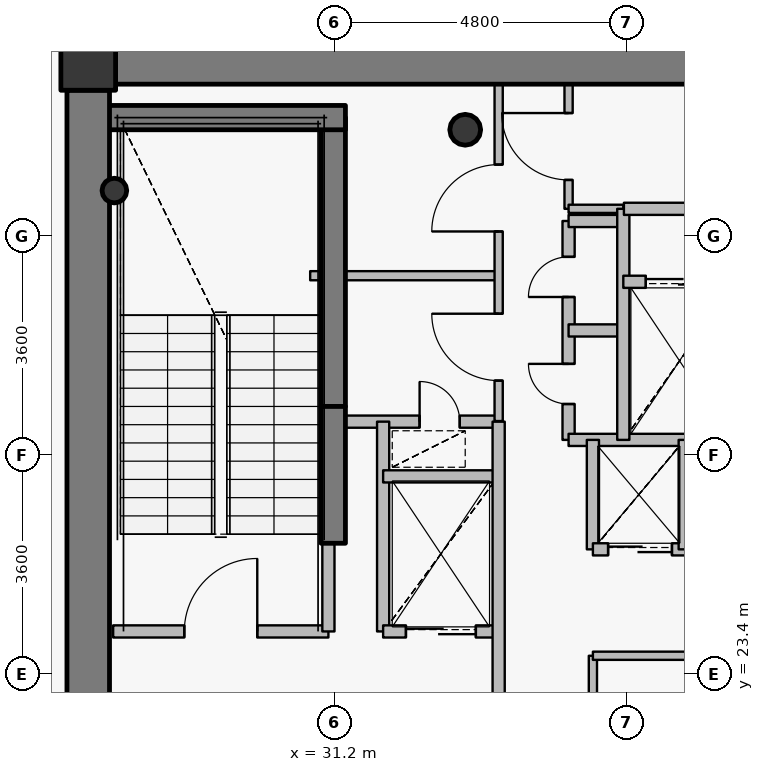
"""IFC4 building model, lengths in metres.
Left out: names, types, materials, properties, quantities, classifications, styles, units other than length and angle.
Written with IfcOpenShell. Run it as: python <this file> out.ifc"""

import sys

from ifc_helpers import new_model, si_unit, direction, frame, frame_2d, origin, origin_2d, place, context, subcontext, project, spatial, rectangle, hollow_circle, extrude, source, transform, mapped, element, fill, save


model = new_model("IFC4")
c1 = context("Model", 3, precision=1e-05, world=origin(), true_north=direction((0.0, 1.0)))
c2 = subcontext(c1, "Body", "Model", "MODEL_VIEW")
j1 = project(units=[si_unit("LENGTHUNIT", "METRE"), si_unit("PLANEANGLEUNIT", "RADIAN")], contexts=[c1])
p1 = place(None, origin())
s1 = spatial("IfcSite", under=j1, at=p1, CompositionType="ELEMENT")
p2 = place(p1, origin())
s2 = spatial("IfcBuilding", under=s1, at=p2, CompositionType="ELEMENT")
p3 = place(p2, frame((0.0, 0.0, 339.2)))
s3 = spatial("IfcBuildingStorey", under=s2, at=p3, CompositionType="ELEMENT", Elevation=339.2)
p4 = place(p3, frame((27.15, 33.45, 0.0), z_axis=(0.0, 0.0, 1.0), x_axis=(1.0, 0.0, 0.0)))
e1 = element("IfcColumn", 1, at=p4, inside=s3, PredefinedType="COLUMN", context=c2, shape_type="SweptSolid", body=[
    extrude(rectangle(XDim=0.9, YDim=0.9, at=origin_2d()), origin(), (0.0, 0.0, 1.0), 3.8),
])
p5 = place(p3, frame((33.35, 32.35, 0.0), z_axis=(0.0, 0.0, 1.0), x_axis=(1.0, 0.0, 0.0)))
e2 = element("IfcColumn", 2, at=p5, inside=s3, PredefinedType="COLUMN", context=c2, shape_type="SweptSolid", body=[
    extrude(hollow_circle(Radius=0.254, WallThickness=0.02, at=origin_2d()), origin(), (0.0, 0.0, 1.0), 3.8),
])
p6 = place(p3, frame((31.18, 27.8, 0.0), z_axis=(0.0, 0.0, 1.0), x_axis=(0.0, 1.0, 0.0)))
e3 = element("IfcWall", 3, at=p6, inside=s3, PredefinedType="SHEAR", context=c2, shape_type="SweptSolid", body=[
    extrude(rectangle(XDim=4.75, YDim=0.4, at=frame_2d((2.375, 0.0))), origin(), (0.0, 0.0, 1.0), 3.8),
])
p7 = place(p3, frame((27.25, 32.55, 0.0), z_axis=(0.0, 0.0, 1.0), x_axis=(1.0, 0.0, 0.0)))
e4 = element("IfcWall", 4, at=p7, inside=s3, PredefinedType="SHEAR", context=c2, shape_type="SweptSolid", body=[
    extrude(rectangle(XDim=4.13, YDim=0.4, at=frame_2d((2.065, 0.0))), origin(), (0.0, 0.0, 1.0), 3.8),
])
p8 = place(p3, frame((27.58, 31.35, 0.0), z_axis=(0.0, 0.0, 1.0), x_axis=(1.0, 0.0, 0.0)))
e5 = element("IfcColumn", 5, at=p8, inside=s3, PredefinedType="COLUMN", context=c2, shape_type="SweptSolid", body=[
    extrude(hollow_circle(Radius=0.203, WallThickness=0.016, at=origin_2d()), origin(), (0.0, 0.0, 1.0), 3.8),
])
p9 = place(p3, frame((27.6, 33.45, 0.0), z_axis=(0.0, 0.0, 1.0), x_axis=(1.0, 0.0, 0.0)))
e6 = element("IfcWall", 6, at=p9, inside=s3, PredefinedType="SHEAR", context=c2, shape_type="SweptSolid", body=[
    extrude(rectangle(XDim=16.8, YDim=0.7, at=frame_2d((8.4, 0.0))), origin(), (0.0, 0.0, 1.0), 3.1),
])
p10 = place(p9, frame((12.85, 0.0, 0.0)))
e7 = element("IfcOpeningElement", 7, at=p10, cuts=e6, PredefinedType="OPENING", context=c2, shape_type="SweptSolid", body=[
    extrude(rectangle(XDim=1.15, YDim=2.15, at=origin_2d()), frame((0.575, 0.36, 1.075), z_axis=(0.0, -1.0, 0.0), x_axis=(1.0, 0.0, 0.0)), (0.0, 0.0, 1.0), 0.72),
])
p11 = place(p3, frame((27.15, 21.0, 0.0), z_axis=(0.0, 0.0, 1.0), x_axis=(0.0, 1.0, 0.0)))
e8 = element("IfcWall", 8, at=p11, inside=s3, PredefinedType="SHEAR", context=c2, shape_type="SweptSolid", body=[
    extrude(rectangle(XDim=12.0, YDim=0.7, at=frame_2d((6.0, 0.0))), origin(), (0.0, 0.0, 1.0), 3.1),
])
p12 = place(p3, frame((31.18, 25.55, 0.0), z_axis=(0.0, 0.0, 1.0), x_axis=(0.0, 1.0, 0.0)))
e9 = element("IfcWall", 9, at=p12, inside=s3, PredefinedType="SHEAR", context=c2, shape_type="SweptSolid", body=[
    extrude(rectangle(XDim=2.25, YDim=0.4, at=frame_2d((1.125, 0.0))), origin(), (0.0, 0.0, 1.0), 3.15),
])
p13 = place(p3, frame((27.56, 24.1, 0.0), z_axis=(0.0, 0.0, 1.0), x_axis=(1.0, 0.0, 0.0)))
e10 = element("IfcWall", 10, at=p13, inside=s3, PredefinedType="PARTITIONING", context=c2, shape_type="SweptSolid", body=[
    extrude(rectangle(XDim=3.54, YDim=0.2, at=frame_2d((1.77, 0.0))), origin(), (0.0, 0.0, 1.0), 3.55),
])
p14 = place(p13, frame((1.17, 0.0, 0.0)))
e11 = element("IfcOpeningElement", 11, at=p14, cuts=e10, PredefinedType="OPENING", context=c2, shape_type="SweptSolid", body=[
    extrude(rectangle(XDim=1.2, YDim=2.15, at=origin_2d()), frame((0.6, 0.11, 1.075), z_axis=(0.0, -1.0, 0.0), x_axis=(1.0, 0.0, 0.0)), (0.0, 0.0, 1.0), 0.22),
])
p15 = place(p3, frame((30.8, 29.95, 0.0), z_axis=(0.0, 0.0, 1.0), x_axis=(1.0, 0.0, 0.0)))
e12 = element("IfcWall", 12, at=p15, inside=s3, PredefinedType="PARTITIONING", context=c2, shape_type="SweptSolid", body=[
    extrude(rectangle(XDim=3.1, YDim=0.15, at=frame_2d((1.55, 0.0))), origin(), (0.0, 0.0, 1.0), 3.135),
])
p16 = place(p3, frame((31.1, 24.1, 0.0), z_axis=(0.0, 0.0, 1.0), x_axis=(0.0, 1.0, 0.0)))
e13 = element("IfcWall", 13, at=p16, inside=s3, PredefinedType="PARTITIONING", context=c2, shape_type="SweptSolid", body=[
    extrude(rectangle(XDim=1.44, YDim=0.2, at=frame_2d((0.72, 0.0))), origin(), (0.0, 0.0, 1.0), 3.55),
])
p17 = place(p3, frame((31.1, 27.55, 0.0), z_axis=(0.0, 0.0, 1.0), x_axis=(1.0, 0.0, 0.0)))
e14 = element("IfcWall", 14, at=p17, inside=s3, PredefinedType="PARTITIONING", context=c2, shape_type="SweptSolid", body=[
    extrude(rectangle(XDim=2.8, YDim=0.2, at=frame_2d((1.4, 0.0))), origin(), (0.0, 0.0, 1.0), 3.135),
])
p18 = place(p17, frame((1.5, 0.0, 0.0)))
e15 = element("IfcOpeningElement", 15, at=p18, cuts=e14, PredefinedType="OPENING", context=c2, shape_type="SweptSolid", body=[
    extrude(rectangle(XDim=0.66, YDim=2.05, at=origin_2d()), frame((0.33, 0.11, 1.025), z_axis=(0.0, -1.0, 0.0), x_axis=(1.0, 0.0, 0.0)), (0.0, 0.0, 1.0), 0.22),
])
p19 = place(p3, frame((32.0, 24.1, 0.0), z_axis=(0.0, 0.0, 1.0), x_axis=(0.0, 1.0, 0.0)))
e16 = element("IfcWall", 16, at=p19, inside=s3, PredefinedType="PARTITIONING", context=c2, shape_type="SweptSolid", body=[
    extrude(rectangle(XDim=3.45, YDim=0.2, at=frame_2d((1.725, 0.0))), origin(), (0.0, 0.0, 1.0), 3.55),
])
p20 = place(p3, frame((32.0, 24.1, 0.0), z_axis=(0.0, 0.0, 1.0), x_axis=(1.0, 0.0, 0.0)))
e17 = element("IfcWall", 17, at=p20, inside=s3, PredefinedType="PARTITIONING", context=c2, shape_type="SweptSolid", body=[
    extrude(rectangle(XDim=1.9, YDim=0.2, at=frame_2d((0.95, 0.0))), origin(), (0.0, 0.0, 1.0), 3.135),
])
p21 = place(p20, frame((0.375, 0.0, 0.0)))
e18 = element("IfcOpeningElement", 18, at=p21, cuts=e17, PredefinedType="OPENING", context=c2, shape_type="SweptSolid", body=[
    extrude(rectangle(XDim=1.15, YDim=2.15, at=origin_2d()), frame((0.575, 0.11, 1.075), z_axis=(0.0, -1.0, 0.0), x_axis=(1.0, 0.0, 0.0)), (0.0, 0.0, 1.0), 0.22),
])
p22 = place(p3, frame((32.0, 26.65, 0.0), z_axis=(0.0, 0.0, 1.0), x_axis=(1.0, 0.0, 0.0)))
e19 = element("IfcWall", 19, at=p22, inside=s3, PredefinedType="PARTITIONING", context=c2, shape_type="SweptSolid", body=[
    extrude(rectangle(XDim=1.9, YDim=0.2, at=frame_2d((0.95, 0.0))), origin(), (0.0, 0.0, 1.0), 3.135),
])
p23 = place(p3, frame((33.9, 20.9, 0.0), z_axis=(0.0, 0.0, 1.0), x_axis=(0.0, 1.0, 0.0)))
e20 = element("IfcWall", 20, at=p23, inside=s3, PredefinedType="PARTITIONING", context=c2, shape_type="SweptSolid", body=[
    extrude(rectangle(XDim=6.65, YDim=0.2, at=frame_2d((3.325, 0.0))), origin(), (0.0, 0.0, 1.0), 3.135),
])
p24 = place(p3, frame((33.9, 27.56, 0.0), z_axis=(0.0, 0.0, 1.0), x_axis=(0.0, 1.0, 0.0)))
e21 = element("IfcWall", 21, at=p24, inside=s3, PredefinedType="PARTITIONING", context=c2, shape_type="SweptSolid", body=[
    extrude(rectangle(XDim=5.54, YDim=0.135, at=frame_2d((2.77, 0.0))), origin(), (0.0, 0.0, 1.0), 3.135),
])
p25 = place(p24, frame((0.665, 0.0, 0.0)))
e22 = element("IfcOpeningElement", 22, at=p25, cuts=e21, PredefinedType="OPENING", context=c2, shape_type="SweptSolid", body=[
    extrude(rectangle(XDim=1.1, YDim=2.15, at=origin_2d()), frame((0.55, 0.078, 1.075), z_axis=(0.0, -1.0, 0.0), x_axis=(1.0, 0.0, 0.0)), (0.0, 0.0, 1.0), 0.155),
])
p26 = place(p24, frame((3.117, 0.0, 0.0)))
e23 = element("IfcOpeningElement", 23, at=p26, cuts=e21, PredefinedType="OPENING", context=c2, shape_type="SweptSolid", body=[
    extrude(rectangle(XDim=1.1, YDim=2.15, at=origin_2d()), frame((0.55, 0.078, 1.075), z_axis=(0.0, -1.0, 0.0), x_axis=(1.0, 0.0, 0.0)), (0.0, 0.0, 1.0), 0.155),
])
p27 = place(p3, frame((35.05, 27.25, 0.0), z_axis=(0.0, 0.0, 1.0), x_axis=(0.0, 1.0, 0.0)))
e24 = element("IfcWall", 24, at=p27, inside=s3, PredefinedType="PARTITIONING", context=c2, shape_type="SweptSolid", body=[
    extrude(rectangle(XDim=3.6, YDim=0.2, at=frame_2d((1.8, 0.0))), origin(), (0.0, 0.0, 1.0), 3.55),
])
p28 = place(p27, frame((0.59, 0.0, 0.0)))
e25 = element("IfcOpeningElement", 25, at=p28, cuts=e24, PredefinedType="OPENING", context=c2, shape_type="SweptSolid", body=[
    extrude(rectangle(XDim=0.66, YDim=2.05, at=origin_2d()), frame((0.33, 0.11, 1.025), z_axis=(0.0, -1.0, 0.0), x_axis=(1.0, 0.0, 0.0)), (0.0, 0.0, 1.0), 0.22),
])
p29 = place(p27, frame((2.35, 0.0, 0.0)))
e26 = element("IfcOpeningElement", 26, at=p29, cuts=e24, PredefinedType="OPENING", context=c2, shape_type="SweptSolid", body=[
    extrude(rectangle(XDim=0.66, YDim=2.05, at=origin_2d()), frame((0.33, 0.11, 1.025), z_axis=(0.0, -1.0, 0.0), x_axis=(1.0, 0.0, 0.0)), (0.0, 0.0, 1.0), 0.22),
])
p30 = place(p3, frame((35.05, 27.25, 0.0), z_axis=(0.0, 0.0, 1.0), x_axis=(1.0, 0.0, 0.0)))
e27 = element("IfcWall", 27, at=p30, inside=s3, PredefinedType="PARTITIONING", context=c2, shape_type="SweptSolid", body=[
    extrude(rectangle(XDim=4.95, YDim=0.2, at=frame_2d((2.475, 0.0))), origin(), (0.0, 0.0, 1.0), 3.135),
])
for number, where, z_axis, x_axis in (
    (28, (35.05, 29.05, 0.0), (0.0, 0.0, 1.0), (1.0, 0.0, 0.0)),
    (29, (35.05, 30.85, 0.0), (0.0, 0.0, 1.0), (1.0, 0.0, 0.0)),
):
    element("IfcWall", number, at=place(p3, frame(where, z_axis=z_axis, x_axis=x_axis)), inside=s3, PredefinedType="PARTITIONING", context=c2, shape_type="SweptSolid", body=[
        extrude(rectangle(XDim=0.9, YDim=0.2, at=frame_2d((0.45, 0.0))), origin(), (0.0, 0.0, 1.0), 3.55),
    ])
p31 = place(p3, frame((35.05, 31.05, 0.0), z_axis=(0.0, 0.0, 1.0), x_axis=(0.0, 1.0, 0.0)))
e30 = element("IfcWall", 30, at=p31, inside=s3, PredefinedType="PARTITIONING", context=c2, shape_type="SweptSolid", body=[
    extrude(rectangle(XDim=2.05, YDim=0.135, at=frame_2d((1.025, 0.0))), origin(), (0.0, 0.0, 1.0), 3.135),
])
p32 = place(p31, frame((0.475, 0.0, 0.0)))
e31 = element("IfcOpeningElement", 31, at=p32, cuts=e30, PredefinedType="OPENING", context=c2, shape_type="SweptSolid", body=[
    extrude(rectangle(XDim=1.1, YDim=2.15, at=origin_2d()), frame((0.55, 0.078, 1.075), z_axis=(0.0, -1.0, 0.0), x_axis=(1.0, 0.0, 0.0)), (0.0, 0.0, 1.0), 0.155),
])
p33 = place(p3, frame((35.05, 31.05, 0.0), z_axis=(0.0, 0.0, 1.0), x_axis=(1.0, 0.0, 0.0)))
e32 = element("IfcWall", 32, at=p33, inside=s3, PredefinedType="PARTITIONING", context=c2, shape_type="SweptSolid", body=[
    extrude(rectangle(XDim=0.9, YDim=0.135, at=frame_2d((0.45, 0.0))), origin(), (0.0, 0.0, 1.0), 3.55),
])
p34 = place(p3, frame((35.45, 20.9, 0.0), z_axis=(0.0, 0.0, 1.0), x_axis=(0.0, 1.0, 0.0)))
e33 = element("IfcWall", 33, at=p34, inside=s3, PredefinedType="PARTITIONING", context=c2, shape_type="SweptSolid", body=[
    extrude(rectangle(XDim=2.8, YDim=0.135, at=frame_2d((1.4, 0.0))), origin(), (0.0, 0.0, 1.0), 3.135),
])
p35 = place(p34, frame((0.85, 0.0, 0.0)))
e34 = element("IfcOpeningElement", 34, at=p35, cuts=e33, PredefinedType="OPENING", context=c2, shape_type="SweptSolid", body=[
    extrude(rectangle(XDim=1.1, YDim=2.15, at=origin_2d()), frame((0.55, 0.078, 1.075), z_axis=(0.0, -1.0, 0.0), x_axis=(1.0, 0.0, 0.0)), (0.0, 0.0, 1.0), 0.155),
])
p36 = place(p3, frame((35.45, 23.7, 0.0), z_axis=(0.0, 0.0, 1.0), x_axis=(1.0, 0.0, 0.0)))
e35 = element("IfcWall", 35, at=p36, inside=s3, PredefinedType="PARTITIONING", context=c2, shape_type="SweptSolid", body=[
    extrude(rectangle(XDim=4.35, YDim=0.135, at=frame_2d((2.175, 0.0))), origin(), (0.0, 0.0, 1.0), 3.135),
])
p37 = place(p36, frame((2.905, 0.0, 0.0)))
e36 = element("IfcOpeningElement", 36, at=p37, cuts=e35, PredefinedType="OPENING", context=c2, shape_type="SweptSolid", body=[
    extrude(rectangle(XDim=1.1, YDim=2.15, at=origin_2d()), frame((0.55, 0.078, 1.075), z_axis=(0.0, -1.0, 0.0), x_axis=(1.0, 0.0, 0.0)), (0.0, 0.0, 1.0), 0.155),
])
p38 = place(p3, frame((35.45, 25.45, 0.0), z_axis=(0.0, 0.0, 1.0), x_axis=(0.0, 1.0, 0.0)))
e37 = element("IfcWall", 37, at=p38, inside=s3, PredefinedType="PARTITIONING", context=c2, shape_type="SweptSolid", body=[
    extrude(rectangle(XDim=1.8, YDim=0.2, at=frame_2d((0.9, 0.0))), origin(), (0.0, 0.0, 1.0), 3.55),
])
p39 = place(p3, frame((35.45, 25.45, 0.0), z_axis=(0.0, 0.0, 1.0), x_axis=(1.0, 0.0, 0.0)))
e38 = element("IfcWall", 38, at=p39, inside=s3, PredefinedType="PARTITIONING", context=c2, shape_type="SweptSolid", body=[
    extrude(rectangle(XDim=4.55, YDim=0.2, at=frame_2d((2.275, 0.0))), origin(), (0.0, 0.0, 1.0), 3.135),
])
p40 = place(p39, frame((0.25, 0.0, 0.0)))
e39 = element("IfcOpeningElement", 39, at=p40, cuts=e38, PredefinedType="OPENING", context=c2, shape_type="SweptSolid", body=[
    extrude(rectangle(XDim=1.05, YDim=2.15, at=origin_2d()), frame((0.525, 0.11, 1.075), z_axis=(0.0, -1.0, 0.0), x_axis=(1.0, 0.0, 0.0)), (0.0, 0.0, 1.0), 0.22),
])
p41 = place(p39, frame((1.745, 0.0, 0.0)))
e40 = element("IfcOpeningElement", 40, at=p41, cuts=e38, PredefinedType="OPENING", context=c2, shape_type="SweptSolid", body=[
    extrude(rectangle(XDim=1.05, YDim=2.15, at=origin_2d()), frame((0.525, 0.11, 1.075), z_axis=(0.0, -1.0, 0.0), x_axis=(1.0, 0.0, 0.0)), (0.0, 0.0, 1.0), 0.22),
])
p42 = place(p39, frame((3.165, 0.0, 0.0)))
e41 = element("IfcOpeningElement", 41, at=p42, cuts=e38, PredefinedType="OPENING", context=c2, shape_type="SweptSolid", body=[
    extrude(rectangle(XDim=1.05, YDim=2.15, at=origin_2d()), frame((0.525, 0.11, 1.075), z_axis=(0.0, -1.0, 0.0), x_axis=(1.0, 0.0, 0.0)), (0.0, 0.0, 1.0), 0.22),
])
p43 = place(p3, frame((35.95, 27.25, 0.0), z_axis=(0.0, 0.0, 1.0), x_axis=(0.0, 1.0, 0.0)))
e42 = element("IfcWall", 42, at=p43, inside=s3, PredefinedType="PARTITIONING", context=c2, shape_type="SweptSolid", body=[
    extrude(rectangle(XDim=3.8, YDim=0.2, at=frame_2d((1.9, 0.0))), origin(), (0.0, 0.0, 1.0), 3.55),
])
p44 = place(p3, frame((35.95, 29.85, 0.0), z_axis=(0.0, 0.0, 1.0), x_axis=(1.0, 0.0, 0.0)))
e43 = element("IfcWall", 43, at=p44, inside=s3, PredefinedType="PARTITIONING", context=c2, shape_type="SweptSolid", body=[
    extrude(rectangle(XDim=8.49, YDim=0.2, at=frame_2d((4.245, 0.0))), origin(), (0.0, 0.0, 1.0), 3.135),
])
p45 = place(p44, frame((6.1, 0.0, 0.0)))
e44 = element("IfcOpeningElement", 44, at=p45, cuts=e43, PredefinedType="OPENING", context=c2, shape_type="SweptSolid", body=[
    extrude(rectangle(XDim=1.2, YDim=2.15, at=origin_2d()), frame((0.6, 0.11, 1.075), z_axis=(0.0, -1.0, 0.0), x_axis=(1.0, 0.0, 0.0)), (0.0, 0.0, 1.0), 0.22),
])
p46 = place(p44, frame((0.37, 0.0, 0.0)))
e45 = element("IfcOpeningElement", 45, at=p46, cuts=e43, PredefinedType="OPENING", context=c2, shape_type="SweptSolid", body=[
    extrude(rectangle(XDim=1.15, YDim=2.15, at=origin_2d()), frame((0.575, 0.11, 1.075), z_axis=(0.0, -1.0, 0.0), x_axis=(1.0, 0.0, 0.0)), (0.0, 0.0, 1.0), 0.22),
])
p47 = place(p44, frame((2.425, 0.0, 0.0)))
e46 = element("IfcOpeningElement", 46, at=p47, cuts=e43, PredefinedType="OPENING", context=c2, shape_type="SweptSolid", body=[
    extrude(rectangle(XDim=1.05, YDim=2.15, at=origin_2d()), frame((0.525, 0.11, 1.075), z_axis=(0.0, -1.0, 0.0), x_axis=(1.0, 0.0, 0.0)), (0.0, 0.0, 1.0), 0.22),
])
p48 = place(p3, frame((35.96, 31.05, 0.0), z_axis=(0.0, 0.0, 1.0), x_axis=(1.0, 0.0, 0.0)))
e47 = element("IfcWall", 47, at=p48, inside=s3, PredefinedType="PARTITIONING", context=c2, shape_type="SweptSolid", body=[
    extrude(rectangle(XDim=1.84, YDim=0.2, at=frame_2d((0.92, 0.0))), origin(), (0.0, 0.0, 1.0), 3.55),
])
p49 = place(p3, frame((36.96, 25.45, 0.0), z_axis=(0.0, 0.0, 1.0), x_axis=(0.0, 1.0, 0.0)))
e48 = element("IfcWall", 48, at=p49, inside=s3, PredefinedType="PARTITIONING", context=c2, shape_type="SweptSolid", body=[
    extrude(rectangle(XDim=1.8, YDim=0.2, at=frame_2d((0.9, 0.0))), origin(), (0.0, 0.0, 1.0), 3.55),
])
p50 = place(p3, frame((26.8, 33.492, 0.0), z_axis=(0.0, 0.0, 1.0), x_axis=(0.0, -1.0, 0.0)))
e49 = element("IfcWall", 49, at=p50, inside=s3, PredefinedType="PARTITIONING", context=c2, shape_type="SweptSolid", body=[
    extrude(rectangle(XDim=0.482, YDim=0.135, at=frame_2d((0.241, 0.0))), origin(), (0.0, 0.0, 1.0), 3.55),
])
m1 = source(origin(), c2, "Body", "SweptSolid", [
    extrude(rectangle(XDim=1.2, YDim=2.15, at=origin_2d()), frame((0.6, 0.025, 1.075), z_axis=(0.0, -1.0, 0.0), x_axis=(1.0, 0.0, 0.0)), (0.0, 0.0, 1.0), 0.05),
])
p51 = place(p14, origin())
e50 = element("IfcDoor", 50, at=p51, inside=s3, OperationType="SINGLE_SWING_RIGHT", PredefinedType="DOOR", context=c2, shape_type="MappedRepresentation", body=[
    mapped(m1, transform((0.0, 0.0, 0.0), x_axis=(1.0, 0.0, 0.0), y_axis=(0.0, 1.0, 0.0), z_axis=(0.0, 0.0, 1.0), scale=1.0)),
])
fill(e11, e50)
m2 = source(origin(), c2, "Body", "SweptSolid", [
    extrude(rectangle(XDim=1.15, YDim=2.15, at=origin_2d()), frame((0.575, 0.025, 1.075), z_axis=(0.0, -1.0, 0.0), x_axis=(1.0, 0.0, 0.0)), (0.0, 0.0, 1.0), 0.05),
])
p52 = place(p46, origin())
e51 = element("IfcDoor", 51, at=p52, inside=s3, OperationType="DOUBLE_DOOR_SLIDING", PredefinedType="USERDEFINED", context=c2, shape_type="MappedRepresentation", body=[
    mapped(m2, transform((0.0, 0.0, 0.0), x_axis=(1.0, 0.0, 0.0), y_axis=(0.0, 1.0, 0.0), z_axis=(0.0, 0.0, 1.0), scale=1.0)),
])
fill(e45, e51)
p53 = place(p21, origin())
e52 = element("IfcDoor", 52, at=p53, inside=s3, OperationType="DOUBLE_DOOR_SLIDING", PredefinedType="USERDEFINED", context=c2, shape_type="MappedRepresentation", body=[
    mapped(m2, transform((0.0, 0.0, 0.0), x_axis=(1.0, 0.0, 0.0), y_axis=(0.0, 1.0, 0.0), z_axis=(0.0, 0.0, 1.0), scale=1.0)),
])
fill(e18, e52)
m3 = source(origin(), c2, "Body", "SweptSolid", [
    extrude(rectangle(XDim=1.05, YDim=2.15, at=origin_2d()), frame((0.525, 0.025, 1.075), z_axis=(0.0, -1.0, 0.0), x_axis=(1.0, 0.0, 0.0)), (0.0, 0.0, 1.0), 0.05),
])
p54 = place(p40, origin())
e53 = element("IfcDoor", 53, at=p54, inside=s3, OperationType="DOUBLE_DOOR_SLIDING", PredefinedType="USERDEFINED", context=c2, shape_type="MappedRepresentation", body=[
    mapped(m3, transform((0.0, 0.0, 0.0), x_axis=(1.0, 0.0, 0.0), y_axis=(0.0, 1.0, 0.0), z_axis=(0.0, 0.0, 1.0), scale=1.0)),
])
fill(e39, e53)
m4 = source(origin(), c2, "Body", "SweptSolid", [
    extrude(rectangle(XDim=0.66, YDim=2.05, at=origin_2d()), frame((0.33, 0.025, 1.025), z_axis=(0.0, -1.0, 0.0), x_axis=(1.0, 0.0, 0.0)), (0.0, 0.0, 1.0), 0.05),
])
p55 = place(p28, origin())
e54 = element("IfcDoor", 54, at=p55, inside=s3, OperationType="SINGLE_SWING_RIGHT", PredefinedType="USERDEFINED", context=c2, shape_type="MappedRepresentation", body=[
    mapped(m4, transform((0.0, 0.0, 0.0), x_axis=(1.0, 0.0, 0.0), y_axis=(0.0, 1.0, 0.0), z_axis=(0.0, 0.0, 1.0), scale=1.0)),
])
fill(e25, e54)
p56 = place(p29, origin())
e55 = element("IfcDoor", 55, at=p56, inside=s3, OperationType="SINGLE_SWING_LEFT", PredefinedType="USERDEFINED", context=c2, shape_type="MappedRepresentation", body=[
    mapped(m4, transform((0.0, 0.0, 0.0), x_axis=(1.0, 0.0, 0.0), y_axis=(0.0, 1.0, 0.0), z_axis=(0.0, 0.0, 1.0), scale=1.0)),
])
fill(e26, e55)
m5 = source(origin(), c2, "Body", "SweptSolid", [
    extrude(rectangle(XDim=1.1, YDim=2.15, at=origin_2d()), frame((0.55, 0.025, 1.075), z_axis=(0.0, -1.0, 0.0), x_axis=(1.0, 0.0, 0.0)), (0.0, 0.0, 1.0), 0.05),
])
p57 = place(p25, origin())
e56 = element("IfcDoor", 56, at=p57, inside=s3, OperationType="SINGLE_SWING_RIGHT", PredefinedType="DOOR", context=c2, shape_type="MappedRepresentation", body=[
    mapped(m5, transform((0.0, 0.0, 0.0), x_axis=(1.0, 0.0, 0.0), y_axis=(0.0, 1.0, 0.0), z_axis=(0.0, 0.0, 1.0), scale=1.0)),
])
fill(e22, e56)
p58 = place(p26, origin())
e57 = element("IfcDoor", 57, at=p58, inside=s3, OperationType="SINGLE_SWING_LEFT", PredefinedType="DOOR", context=c2, shape_type="MappedRepresentation", body=[
    mapped(m5, transform((0.0, 0.0, 0.0), x_axis=(1.0, 0.0, 0.0), y_axis=(0.0, 1.0, 0.0), z_axis=(0.0, 0.0, 1.0), scale=1.0)),
])
fill(e23, e57)
p59 = place(p32, origin())
e58 = element("IfcDoor", 58, at=p59, inside=s3, OperationType="SINGLE_SWING_RIGHT", PredefinedType="DOOR", context=c2, shape_type="MappedRepresentation", body=[
    mapped(m5, transform((0.0, 0.0, 0.0), x_axis=(1.0, 0.0, 0.0), y_axis=(0.0, 1.0, 0.0), z_axis=(0.0, 0.0, 1.0), scale=1.0)),
])
fill(e31, e58)
p60 = place(p18, origin())
e59 = element("IfcDoor", 59, at=p60, inside=s3, OperationType="SINGLE_SWING_LEFT", PredefinedType="USERDEFINED", context=c2, shape_type="MappedRepresentation", body=[
    mapped(m4, transform((0.0, 0.0, 0.0), x_axis=(1.0, 0.0, 0.0), y_axis=(0.0, 1.0, 0.0), z_axis=(0.0, 0.0, 1.0), scale=1.0)),
])
fill(e15, e59)
save(model, sys.argv[1])
